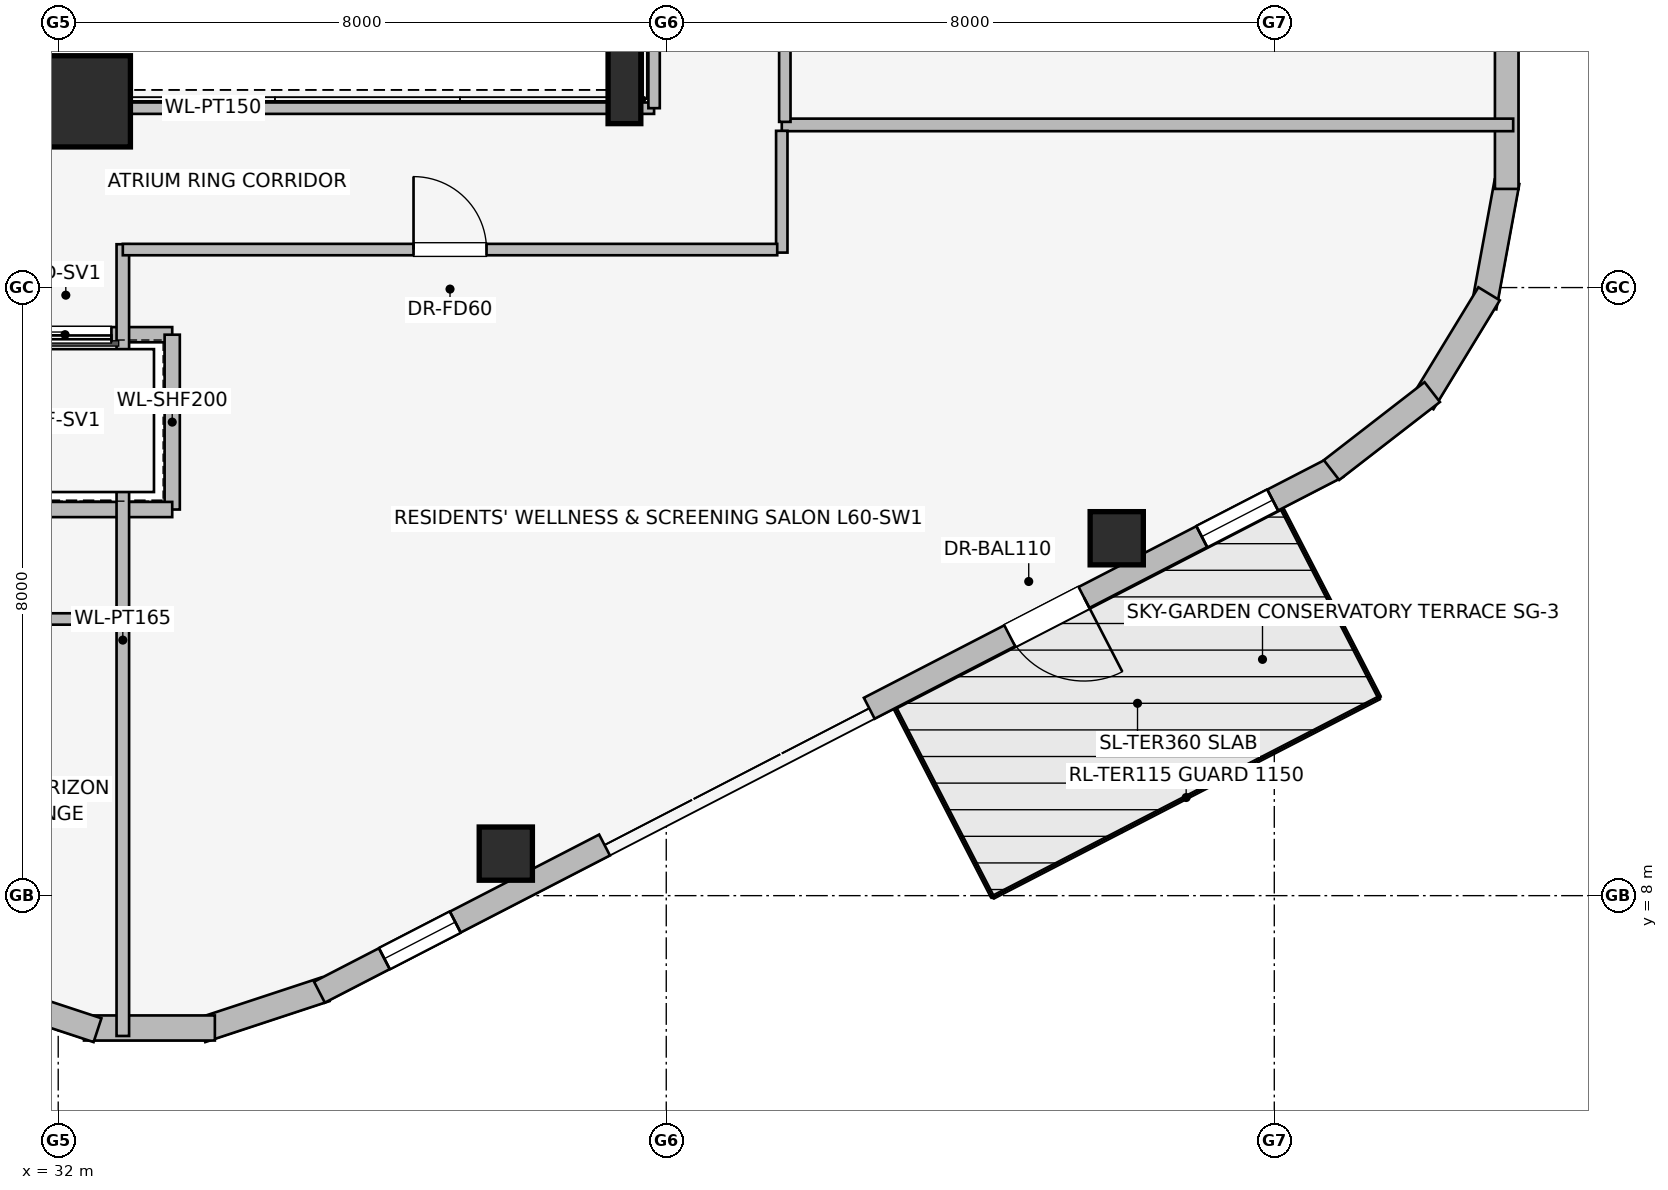
"""IFC4 building model, lengths in metres.
Left out: names, types, materials, properties, quantities, classifications, styles, units other than length and angle.
Written with IfcOpenShell. Run it as: python <this file> out.ifc"""

import sys

from ifc_helpers import new_model, si_unit, direction, frame, frame_2d, origin, origin_2d, place, context, subcontext, project, spatial, rectangle, i_section, extrude, element, fill, save


model = new_model("IFC4")
c1 = context("Model", 3, precision=1e-05, world=origin(), true_north=direction((0.0, 1.0)))
c2 = subcontext(c1, "Body", "Model", "MODEL_VIEW")
j1 = project(units=[si_unit("LENGTHUNIT", "METRE"), si_unit("PLANEANGLEUNIT", "RADIAN")], contexts=[c1])
p1 = place(None, origin())
s1 = spatial("IfcSite", under=j1, at=p1, CompositionType="ELEMENT")
p2 = place(p1, origin())
s2 = spatial("IfcBuilding", under=s1, at=p2, CompositionType="ELEMENT")
p3 = place(p2, frame((0.0, 0.0, 220.6)))
s3 = spatial("IfcBuildingStorey", under=s2, at=p3, CompositionType="ELEMENT", Elevation=220.6)
p4 = place(p3, frame((32.35, 18.45, 0.0), z_axis=(0.0, 0.0, 1.0), x_axis=(1.0, 0.0, 0.0)))
e1 = element("IfcColumn", 1, at=p4, inside=s3, PredefinedType="COLUMN", context=c2, shape_type="SweptSolid", body=[
    extrude(rectangle(XDim=1.2, YDim=1.2, at=origin_2d()), origin(), (0.0, 0.0, 1.0), 3.55),
])
for number, where, z_axis, x_axis in (
    (2, (37.889, 8.553, 0.0), (0.0, 0.0, 1.0), (1.0, 0.0, 0.0)),
    (3, (45.927, 12.702, 0.0), (0.0, 0.0, 1.0), (1.0, 0.0, 0.0)),
):
    element("IfcColumn", number, at=place(p3, frame(where, z_axis=z_axis, x_axis=x_axis)), inside=s3, PredefinedType="COLUMN", context=c2, shape_type="SweptSolid", body=[
        extrude(rectangle(XDim=0.7, YDim=0.7, at=origin_2d()), origin(), (0.0, 0.0, 1.0), 3.55),
    ])
p5 = place(p3, frame((39.45, 18.65, 0.0), z_axis=(0.0, 0.0, 1.0), x_axis=(1.0, 0.0, 0.0)))
e4 = element("IfcColumn", 4, at=p5, inside=s3, PredefinedType="COLUMN", context=c2, shape_type="SweptSolid", body=[
    extrude(i_section(OverallWidth=0.431, OverallDepth=0.987, WebThickness=0.034, FlangeThickness=0.062, at=origin_2d()), origin(), (0.0, 0.0, 1.0), 3.55),
])
p6 = place(p3, frame((35.518, 6.769, 0.0), z_axis=(0.0, 0.0, 1.0), x_axis=(-0.949713440491, -0.313120393699, 0.0)))
e5 = element("IfcWall", 5, at=p6, inside=s3, PredefinedType="STANDARD", context=c2, shape_type="SweptSolid", body=[
    extrude(rectangle(XDim=1.722, YDim=0.33, at=frame_2d((0.861, 0.0))), origin(), (0.0, 0.0, 1.0), 3.29),
])
p7 = place(p3, frame((34.061, 6.259, 0.0), z_axis=(0.0, 0.0, 1.0), x_axis=(-1.0, 0.0, 0.0)))
e6 = element("IfcWall", 6, at=p7, inside=s3, PredefinedType="STANDARD", context=c2, shape_type="SweptSolid", body=[
    extrude(rectangle(XDim=1.722, YDim=0.33, at=frame_2d((0.861, 0.0))), origin(), (0.0, 0.0, 1.0), 3.29),
])
p8 = place(p3, frame((32.517, 6.23, 0.0), z_axis=(0.0, 0.0, 1.0), x_axis=(-0.949713440491, 0.313120393699, 0.0)))
e7 = element("IfcWall", 7, at=p8, inside=s3, PredefinedType="STANDARD", context=c2, shape_type="SweptSolid", body=[
    extrude(rectangle(XDim=1.722, YDim=0.33, at=frame_2d((0.861, 0.0))), origin(), (0.0, 0.0, 1.0), 3.29),
])
p9 = place(p3, frame((48.834, 13.646, 0.0), z_axis=(0.0, 0.0, 1.0), x_axis=(-0.888622971019, -0.458638436437, 0.0)))
e8 = element("IfcWall", 8, at=p9, inside=s3, PredefinedType="STANDARD", context=c2, shape_type="SweptSolid", body=[
    extrude(rectangle(XDim=6.936, YDim=0.31, at=frame_2d((3.468, 0.0))), origin(), (0.0, 0.0, 1.0), 3.29),
])
p10 = place(p9, frame((3.756, 0.0, 0.0)))
e9 = element("IfcOpeningElement", 9, at=p10, cuts=e8, PredefinedType="OPENING", context=c2, shape_type="SweptSolid", body=[
    extrude(rectangle(XDim=1.1, YDim=2.04, at=frame_2d((0.55, 1.02))), frame((0.0, 0.165, 0.0), z_axis=(0.0, -1.0, 0.0), x_axis=(1.0, 0.0, 0.0)), (0.0, 0.0, 1.0), 0.33),
])
p11 = place(p9, frame((0.962, 0.0, 0.75)))
e10 = element("IfcOpeningElement", 10, at=p11, cuts=e8, PredefinedType="OPENING", context=c2, shape_type="SweptSolid", body=[
    extrude(rectangle(XDim=1.05, YDim=1.4, at=frame_2d((0.525, 0.7))), frame((0.0, 0.165, 0.0), z_axis=(0.0, -1.0, 0.0), x_axis=(1.0, 0.0, 0.0)), (0.0, 0.0, 1.0), 0.33),
])
p12 = place(p3, frame((39.188, 8.666, 0.0), z_axis=(0.0, 0.0, 1.0), x_axis=(-0.888616094641, -0.45865175934, 0.0)))
e11 = element("IfcWall", 11, at=p12, inside=s3, PredefinedType="STANDARD", context=c2, shape_type="SweptSolid", body=[
    extrude(rectangle(XDim=4.221, YDim=0.31, at=frame_2d((2.111, 0.0))), origin(), (0.0, 0.0, 1.0), 3.29),
])
p13 = place(p12, frame((2.21, 0.0, 0.75)))
e12 = element("IfcOpeningElement", 12, at=p13, cuts=e11, PredefinedType="OPENING", context=c2, shape_type="SweptSolid", body=[
    extrude(rectangle(XDim=1.05, YDim=1.4, at=frame_2d((0.525, 0.7))), frame((0.0, 0.165, 0.0), z_axis=(0.0, -1.0, 0.0), x_axis=(1.0, 0.0, 0.0)), (0.0, 0.0, 1.0), 0.33),
])
p14 = place(p3, frame((51.062, 17.392, 0.0), z_axis=(0.0, 0.0, 1.0), x_axis=(-0.180691763044, -0.983539773862, 0.0)))
e13 = element("IfcWall", 13, at=p14, inside=s3, PredefinedType="STANDARD", context=c2, shape_type="SweptSolid", body=[
    extrude(rectangle(XDim=1.677, YDim=0.33, at=frame_2d((0.838, 0.0))), origin(), (0.0, 0.0, 1.0), 3.29),
])
p15 = place(p3, frame((50.826, 15.918, 0.0), z_axis=(0.0, 0.0, 1.0), x_axis=(-0.520325409202, -0.853968072318, 0.0)))
e14 = element("IfcWall", 14, at=p15, inside=s3, PredefinedType="STANDARD", context=c2, shape_type="SweptSolid", body=[
    extrude(rectangle(XDim=1.678, YDim=0.33, at=frame_2d((0.839, 0.0))), origin(), (0.0, 0.0, 1.0), 3.29),
])
p16 = place(p3, frame((50.078, 14.625, 0.0), z_axis=(0.0, 0.0, 1.0), x_axis=(-0.790691856293, -0.61221433207, 0.0)))
e15 = element("IfcWall", 15, at=p16, inside=s3, PredefinedType="STANDARD", context=c2, shape_type="SweptSolid", body=[
    extrude(rectangle(XDim=1.676, YDim=0.33, at=frame_2d((0.838, 0.0))), origin(), (0.0, 0.0, 1.0), 3.29),
])
p17 = place(p3, frame((51.058, 30.702, 0.0), z_axis=(0.0, 0.0, 1.0), x_axis=(0.0, -1.0, 0.0)))
e16 = element("IfcWall", 16, at=p17, inside=s3, PredefinedType="STANDARD", context=c2, shape_type="SweptSolid", body=[
    extrude(rectangle(XDim=13.404, YDim=0.31, at=frame_2d((6.702, 0.0))), origin(), (0.0, 0.0, 1.0), 3.29),
])
p18 = place(p17, frame((4.706, 0.0, 0.75)))
e17 = element("IfcOpeningElement", 17, at=p18, cuts=e16, PredefinedType="OPENING", context=c2, shape_type="SweptSolid", body=[
    extrude(rectangle(XDim=2.4, YDim=1.6, at=frame_2d((1.2, 0.8))), frame((0.0, 0.165, 0.0), z_axis=(0.0, -1.0, 0.0), x_axis=(1.0, 0.0, 0.0)), (0.0, 0.0, 1.0), 0.33),
])
p19 = place(p17, frame((8.807, 0.0, 0.75)))
e18 = element("IfcOpeningElement", 18, at=p19, cuts=e16, PredefinedType="OPENING", context=c2, shape_type="SweptSolid", body=[
    extrude(rectangle(XDim=1.05, YDim=1.4, at=frame_2d((0.525, 0.7))), frame((0.0, 0.165, 0.0), z_axis=(0.0, -1.0, 0.0), x_axis=(1.0, 0.0, 0.0)), (0.0, 0.0, 1.0), 0.33),
])
p20 = place(p3, frame((33.5, 15.38, 0.0), z_axis=(0.0, 0.0, 1.0), x_axis=(-1.0, 0.0, 0.0)))
e19 = element("IfcWall", 19, at=p20, inside=s3, PredefinedType="PARTITIONING", context=c2, shape_type="SweptSolid", body=[
    extrude(rectangle(XDim=2.82, YDim=0.2, at=frame_2d((1.41, 0.0))), origin(), (0.0, 0.0, 1.0), 3.29),
])
p21 = place(p20, frame((0.8, 0.0, 0.0)))
e20 = element("IfcOpeningElement", 20, at=p21, cuts=e19, PredefinedType="OPENING", context=c2, shape_type="SweptSolid", body=[
    extrude(rectangle(XDim=1.2, YDim=2.2, at=frame_2d((0.6, 1.1))), frame((0.0, 0.11, 0.0), z_axis=(0.0, -1.0, 0.0), x_axis=(1.0, 0.0, 0.0)), (0.0, 0.0, 1.0), 0.22),
])
p22 = place(p3, frame((33.5, 13.08, 0.0), z_axis=(0.0, 0.0, 1.0), x_axis=(0.0, 1.0, 0.0)))
e21 = element("IfcWall", 21, at=p22, inside=s3, PredefinedType="PARTITIONING", context=c2, shape_type="SweptSolid", body=[
    extrude(rectangle(XDim=2.3, YDim=0.2, at=frame_2d((1.15, 0.0))), origin(), (0.0, 0.0, 1.0), 3.29),
])
p23 = place(p3, frame((30.879, 13.08, 0.0), z_axis=(0.0, 0.0, 1.0), x_axis=(1.0, 0.0, 0.0)))
e22 = element("IfcWall", 22, at=p23, inside=s3, PredefinedType="PARTITIONING", context=c2, shape_type="SweptSolid", body=[
    extrude(rectangle(XDim=2.621, YDim=0.2, at=frame_2d((1.311, 0.0))), origin(), (0.0, 0.0, 1.0), 3.29),
])
p24 = place(p3, frame((27.675, 18.36, 0.0), z_axis=(0.0, 0.0, 1.0), x_axis=(1.0, 0.0, 0.0)))
e23 = element("IfcWall", 23, at=p24, inside=s3, PredefinedType="PARTITIONING", context=c2, shape_type="SweptSolid", body=[
    extrude(rectangle(XDim=12.165, YDim=0.15, at=frame_2d((6.083, 0.0))), origin(), (0.0, 0.0, 1.0), 2.431),
])
p25 = place(p3, frame((39.84, 18.36, 0.0), z_axis=(0.0, 0.0, 1.0), x_axis=(0.0, 1.0, 0.0)))
e24 = element("IfcWall", 24, at=p25, inside=s3, PredefinedType="PARTITIONING", context=c2, shape_type="SweptSolid", body=[
    extrude(rectangle(XDim=11.28, YDim=0.15, at=frame_2d((5.64, 0.0))), origin(), (0.0, 0.0, 1.0), 3.29),
])
p26 = place(p3, frame((32.85, 6.154, 0.0), z_axis=(0.0, 0.0, 1.0), x_axis=(0.0, 1.0, 0.0)))
e25 = element("IfcWall", 25, at=p26, inside=s3, PredefinedType="PARTITIONING", context=c2, shape_type="SweptSolid", body=[
    extrude(rectangle(XDim=10.416, YDim=0.165, at=frame_2d((5.208, 0.0))), origin(), (0.0, 0.0, 1.0), 3.29),
])
p27 = place(p3, frame((21.244, 11.64, 0.0), z_axis=(0.0, 0.0, 1.0), x_axis=(1.0, 0.0, 0.0)))
e26 = element("IfcWall", 26, at=p27, inside=s3, PredefinedType="PARTITIONING", context=c2, shape_type="SweptSolid", body=[
    extrude(rectangle(XDim=11.606, YDim=0.15, at=frame_2d((5.803, 0.0))), origin(), (0.0, 0.0, 1.0), 3.29),
])
p28 = place(p27, frame((4.856, 0.0, 0.0)))
e27 = element("IfcOpeningElement", 27, at=p28, cuts=e26, PredefinedType="OPENING", context=c2, shape_type="SweptSolid", body=[
    extrude(rectangle(XDim=0.9, YDim=2.0, at=frame_2d((0.45, 1.0))), frame((0.0, 0.085, 0.0), z_axis=(0.0, -1.0, 0.0), x_axis=(1.0, 0.0, 0.0)), (0.0, 0.0, 1.0), 0.17),
])
p29 = place(p27, frame((8.306, 0.0, 0.0)))
e28 = element("IfcOpeningElement", 28, at=p29, cuts=e26, PredefinedType="OPENING", context=c2, shape_type="SweptSolid", body=[
    extrude(rectangle(XDim=0.9, YDim=2.0, at=frame_2d((0.45, 1.0))), frame((0.0, 0.085, 0.0), z_axis=(0.0, -1.0, 0.0), x_axis=(1.0, 0.0, 0.0)), (0.0, 0.0, 1.0), 0.17),
])
p30 = place(p3, frame((41.52, 18.14, 0.0), z_axis=(0.0, 0.0, 1.0), x_axis=(1.0, 0.0, 0.0)))
e29 = element("IfcWall", 29, at=p30, inside=s3, PredefinedType="PARTITIONING", context=c2, shape_type="SweptSolid", body=[
    extrude(rectangle(XDim=9.623, YDim=0.165, at=frame_2d((4.812, 0.0))), origin(), (0.0, 0.0, 1.0), 3.29),
])
p31 = place(p3, frame((41.56, 18.18, 0.0), z_axis=(0.0, 0.0, 1.0), x_axis=(0.0, 1.0, 0.0)))
e30 = element("IfcWall", 30, at=p31, inside=s3, PredefinedType="PARTITIONING", context=c2, shape_type="SweptSolid", body=[
    extrude(rectangle(XDim=4.405, YDim=0.15, at=frame_2d((2.203, 0.0))), origin(), (0.0, 0.0, 1.0), 3.29),
])
p32 = place(p31, frame((1.723, 0.0, 0.0)))
e31 = element("IfcOpeningElement", 31, at=p32, cuts=e30, PredefinedType="OPENING", context=c2, shape_type="SweptSolid", body=[
    extrude(rectangle(XDim=0.96, YDim=2.0, at=frame_2d((0.48, 1.0))), frame((0.0, 0.085, 0.0), z_axis=(0.0, -1.0, 0.0), x_axis=(1.0, 0.0, 0.0)), (0.0, 0.0, 1.0), 0.17),
])
p33 = place(p3, frame((41.52, 16.46, 0.0), z_axis=(0.0, 0.0, 1.0), x_axis=(0.0, 1.0, 0.0)))
e32 = element("IfcWall", 32, at=p33, inside=s3, PredefinedType="PARTITIONING", context=c2, shape_type="SweptSolid", body=[
    extrude(rectangle(XDim=1.602, YDim=0.15, at=frame_2d((0.801, 0.0))), origin(), (0.0, 0.0, 1.0), 3.29),
])
p34 = place(p3, frame((32.85, 16.5, 0.0), z_axis=(0.0, 0.0, 1.0), x_axis=(1.0, 0.0, 0.0)))
e33 = element("IfcWall", 33, at=p34, inside=s3, PredefinedType="PARTITIONING", context=c2, shape_type="SweptSolid", body=[
    extrude(rectangle(XDim=8.61, YDim=0.15, at=frame_2d((4.305, 0.0))), origin(), (0.0, 0.0, 1.0), 3.29),
])
p35 = place(p34, frame((3.825, 0.0, 0.0)))
e34 = element("IfcOpeningElement", 34, at=p35, cuts=e33, PredefinedType="OPENING", context=c2, shape_type="SweptSolid", body=[
    extrude(rectangle(XDim=0.96, YDim=2.0, at=frame_2d((0.48, 1.0))), frame((0.0, 0.085, 0.0), z_axis=(0.0, -1.0, 0.0), x_axis=(1.0, 0.0, 0.0)), (0.0, 0.0, 1.0), 0.17),
])
p36 = place(p10, origin())
e35 = element("IfcDoor", 35, at=p36, inside=s3, OperationType="SINGLE_SWING_LEFT", PredefinedType="DOOR", context=c2, shape_type="SweptSolid", body=[
    extrude(rectangle(XDim=1.1, YDim=2.04, at=frame_2d((0.55, 1.02))), frame((0.0, 0.025, 0.0), z_axis=(0.0, -1.0, 0.0), x_axis=(1.0, 0.0, 0.0)), (0.0, 0.0, 1.0), 0.05),
])
fill(e9, e35)
p37 = place(p11, origin())
e36 = element("IfcWindow", 36, at=p37, inside=s3, PartitioningType="SINGLE_PANEL", PredefinedType="WINDOW", context=c2, shape_type="SweptSolid", body=[
    extrude(rectangle(XDim=1.05, YDim=1.4, at=frame_2d((0.525, 0.7))), frame((0.0, 0.03, 0.0), z_axis=(0.0, -1.0, 0.0), x_axis=(1.0, 0.0, 0.0)), (0.0, 0.0, 1.0), 0.06),
])
fill(e10, e36)
p38 = place(p13, origin())
e37 = element("IfcWindow", 37, at=p38, inside=s3, PartitioningType="SINGLE_PANEL", PredefinedType="WINDOW", context=c2, shape_type="SweptSolid", body=[
    extrude(rectangle(XDim=1.05, YDim=1.4, at=frame_2d((0.525, 0.7))), frame((0.0, 0.03, 0.0), z_axis=(0.0, -1.0, 0.0), x_axis=(1.0, 0.0, 0.0)), (0.0, 0.0, 1.0), 0.06),
])
fill(e12, e37)
p39 = place(p21, origin())
e38 = element("IfcDoor", 38, at=p39, inside=s3, OperationType="SLIDING_TO_RIGHT", PredefinedType="DOOR", context=c2, shape_type="SweptSolid", body=[
    extrude(rectangle(XDim=1.2, YDim=2.2, at=frame_2d((0.6, 1.1))), frame((0.0, 0.025, 0.0), z_axis=(0.0, -1.0, 0.0), x_axis=(1.0, 0.0, 0.0)), (0.0, 0.0, 1.0), 0.05),
])
fill(e20, e38)
p40 = place(p35, origin())
e39 = element("IfcDoor", 39, at=p40, inside=s3, OperationType="SINGLE_SWING_LEFT", PredefinedType="DOOR", context=c2, shape_type="SweptSolid", body=[
    extrude(rectangle(XDim=0.96, YDim=2.0, at=frame_2d((0.48, 1.0))), frame((0.0, 0.025, 0.0), z_axis=(0.0, -1.0, 0.0), x_axis=(1.0, 0.0, 0.0)), (0.0, 0.0, 1.0), 0.05),
])
fill(e34, e39)
save(model, sys.argv[1])
